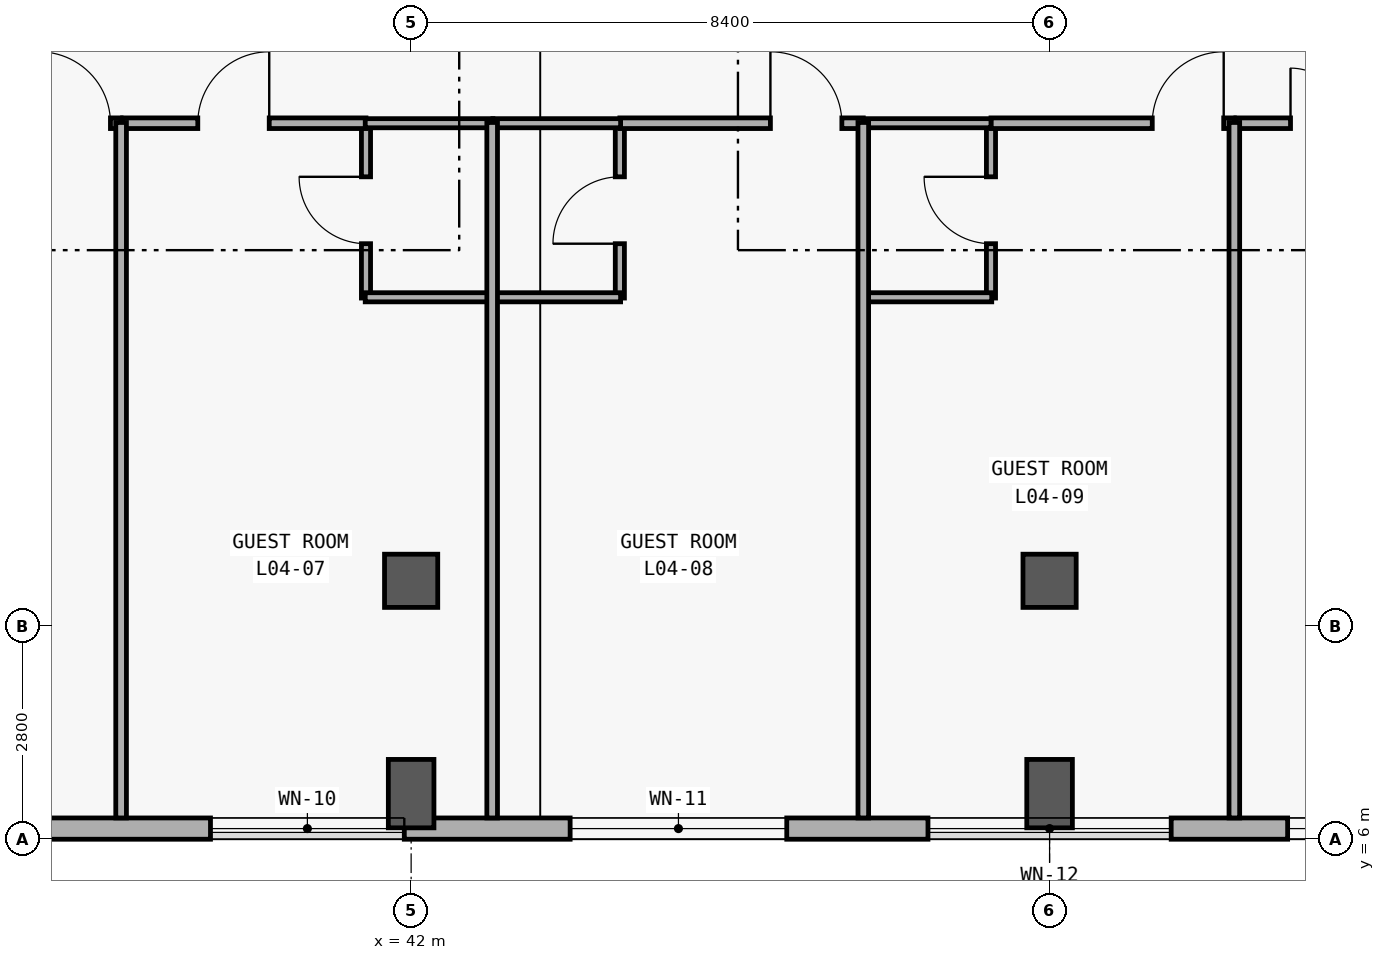
"""IFC4 building model, lengths in metres.
Left out: names, types, materials, properties, quantities, classifications, styles, units other than length and angle.
Written with IfcOpenShell. Run it as: python <this file> out.ifc"""

import sys

from ifc_helpers import new_model, si_unit, direction, frame, frame_2d, origin, origin_2d, place, context, subcontext, project, spatial, rectangle, extrude, element, fill, save


model = new_model("IFC4")
c1 = context("Model", 3, precision=1e-05, world=origin(), true_north=direction((0.0, 1.0)))
c2 = subcontext(c1, "Body", "Model", "MODEL_VIEW")
j1 = project(units=[si_unit("LENGTHUNIT", "METRE"), si_unit("PLANEANGLEUNIT", "RADIAN")], contexts=[c1])
p1 = place(None, origin())
s1 = spatial("IfcSite", under=j1, at=p1, CompositionType="ELEMENT")
p2 = place(p1, origin())
s2 = spatial("IfcBuilding", under=s1, at=p2, CompositionType="ELEMENT")
p3 = place(p2, frame((0.0, 0.0, 19.2)))
s3 = spatial("IfcBuildingStorey", under=s2, at=p3, CompositionType="ELEMENT", Elevation=19.2)
p4 = place(p3, frame((42.0, 6.6, 0.0), z_axis=(0.0, 0.0, 1.0), x_axis=(0.0, 1.0, 0.0)))
e1 = element("IfcColumn", 1, at=p4, inside=s3, PredefinedType="COLUMN", context=c2, shape_type="SweptSolid", body=[
    extrude(rectangle(XDim=0.6, YDim=0.9, at=origin_2d()), origin(), (0.0, 0.0, 1.0), 3.6),
])
p5 = place(p3, frame((42.0, 9.4, 0.0), z_axis=(0.0, 0.0, 1.0), x_axis=(1.0, 0.0, 0.0)))
e2 = element("IfcColumn", 2, at=p5, inside=s3, PredefinedType="COLUMN", context=c2, shape_type="SweptSolid", body=[
    extrude(rectangle(XDim=0.7, YDim=0.7, at=origin_2d()), origin(), (0.0, 0.0, 1.0), 3.6),
])
p6 = place(p3, frame((50.4, 6.6, 0.0), z_axis=(0.0, 0.0, 1.0), x_axis=(0.0, 1.0, 0.0)))
e3 = element("IfcColumn", 3, at=p6, inside=s3, PredefinedType="COLUMN", context=c2, shape_type="SweptSolid", body=[
    extrude(rectangle(XDim=0.6, YDim=0.9, at=origin_2d()), origin(), (0.0, 0.0, 1.0), 3.6),
])
p7 = place(p3, frame((50.4, 9.4, 0.0), z_axis=(0.0, 0.0, 1.0), x_axis=(1.0, 0.0, 0.0)))
e4 = element("IfcColumn", 4, at=p7, inside=s3, PredefinedType="COLUMN", context=c2, shape_type="SweptSolid", body=[
    extrude(rectangle(XDim=0.7, YDim=0.7, at=origin_2d()), origin(), (0.0, 0.0, 1.0), 3.6),
])
p8 = place(p3, frame((92.12, 6.14, 0.0), z_axis=(0.0, 0.0, 1.0), x_axis=(-1.0, 0.0, 0.0)))
e5 = element("IfcWall", 5, at=p8, inside=s3, PredefinedType="SOLIDWALL", context=c2, shape_type="SweptSolid", body=[
    extrude(rectangle(XDim=83.44, YDim=0.28, at=frame_2d((41.72, 0.0))), origin(), (0.0, 0.0, 1.0), 3.32),
])
p9 = place(p8, frame((79.429, 0.0, 0.85)))
e6 = element("IfcOpeningElement", 6, at=p9, cuts=e5, PredefinedType="OPENING", context=c2, shape_type="SweptSolid", body=[
    extrude(rectangle(XDim=2.7, YDim=1.85, at=frame_2d((1.35, 0.925))), frame((0.0, 0.15, 0.0), z_axis=(0.0, -1.0, 0.0), x_axis=(1.0, 0.0, 0.0)), (0.0, 0.0, 1.0), 0.3),
])
p10 = place(p8, frame((74.397, 0.0, 0.85)))
e7 = element("IfcOpeningElement", 7, at=p10, cuts=e5, PredefinedType="OPENING", context=c2, shape_type="SweptSolid", body=[
    extrude(rectangle(XDim=3.0, YDim=1.9, at=frame_2d((1.5, 0.95))), frame((0.0, 0.15, 0.0), z_axis=(0.0, -1.0, 0.0), x_axis=(1.0, 0.0, 0.0)), (0.0, 0.0, 1.0), 0.3),
])
p11 = place(p8, frame((70.264, 0.0, 0.85)))
e8 = element("IfcOpeningElement", 8, at=p11, cuts=e5, PredefinedType="OPENING", context=c2, shape_type="SweptSolid", body=[
    extrude(rectangle(XDim=1.5, YDim=1.75, at=frame_2d((0.75, 0.875))), frame((0.0, 0.15, 0.0), z_axis=(0.0, -1.0, 0.0), x_axis=(1.0, 0.0, 0.0)), (0.0, 0.0, 1.0), 0.3),
])
p12 = place(p8, frame((65.307, 0.0, 0.85)))
e9 = element("IfcOpeningElement", 9, at=p12, cuts=e5, PredefinedType="OPENING", context=c2, shape_type="SweptSolid", body=[
    extrude(rectangle(XDim=1.65, YDim=1.75, at=frame_2d((0.825, 0.875))), frame((0.0, 0.15, 0.0), z_axis=(0.0, -1.0, 0.0), x_axis=(1.0, 0.0, 0.0)), (0.0, 0.0, 1.0), 0.3),
])
p13 = place(p8, frame((60.275, 0.0, 0.85)))
e10 = element("IfcOpeningElement", 10, at=p13, cuts=e5, PredefinedType="OPENING", context=c2, shape_type="SweptSolid", body=[
    extrude(rectangle(XDim=1.95, YDim=1.75, at=frame_2d((0.975, 0.875))), frame((0.0, 0.15, 0.0), z_axis=(0.0, -1.0, 0.0), x_axis=(1.0, 0.0, 0.0)), (0.0, 0.0, 1.0), 0.3),
])
p14 = place(p8, frame((55.242, 0.0, 0.85)))
e11 = element("IfcOpeningElement", 11, at=p14, cuts=e5, PredefinedType="OPENING", context=c2, shape_type="SweptSolid", body=[
    extrude(rectangle(XDim=2.25, YDim=1.75, at=frame_2d((1.125, 0.875))), frame((0.0, 0.15, 0.0), z_axis=(0.0, -1.0, 0.0), x_axis=(1.0, 0.0, 0.0)), (0.0, 0.0, 1.0), 0.3),
])
p15 = place(p8, frame((50.21, 0.0, 0.85)))
e12 = element("IfcOpeningElement", 12, at=p15, cuts=e5, PredefinedType="OPENING", context=c2, shape_type="SweptSolid", body=[
    extrude(rectangle(XDim=2.55, YDim=1.8, at=frame_2d((1.275, 0.9))), frame((0.0, 0.15, 0.0), z_axis=(0.0, -1.0, 0.0), x_axis=(1.0, 0.0, 0.0)), (0.0, 0.0, 1.0), 0.3),
])
p16 = place(p8, frame((45.178, 0.0, 0.85)))
e13 = element("IfcOpeningElement", 13, at=p16, cuts=e5, PredefinedType="OPENING", context=c2, shape_type="SweptSolid", body=[
    extrude(rectangle(XDim=2.85, YDim=1.85, at=frame_2d((1.425, 0.925))), frame((0.0, 0.15, 0.0), z_axis=(0.0, -1.0, 0.0), x_axis=(1.0, 0.0, 0.0)), (0.0, 0.0, 1.0), 0.3),
])
p17 = place(p8, frame((40.12, 0.0, 0.85)))
e14 = element("IfcOpeningElement", 14, at=p17, cuts=e5, PredefinedType="OPENING", context=c2, shape_type="SweptSolid", body=[
    extrude(rectangle(XDim=3.2, YDim=1.95, at=frame_2d((1.6, 0.975))), frame((0.0, 0.15, 0.0), z_axis=(0.0, -1.0, 0.0), x_axis=(1.0, 0.0, 0.0)), (0.0, 0.0, 1.0), 0.3),
])
p18 = place(p8, frame((35.088, 0.0, 0.85)))
e15 = element("IfcOpeningElement", 15, at=p18, cuts=e5, PredefinedType="OPENING", context=c2, shape_type="SweptSolid", body=[
    extrude(rectangle(XDim=3.5, YDim=2.0, at=frame_2d((1.75, 1.0))), frame((0.0, 0.15, 0.0), z_axis=(0.0, -1.0, 0.0), x_axis=(1.0, 0.0, 0.0)), (0.0, 0.0, 1.0), 0.3),
])
p19 = place(p8, frame((31.255, 0.0, 0.85)))
e16 = element("IfcOpeningElement", 16, at=p19, cuts=e5, PredefinedType="OPENING", context=c2, shape_type="SweptSolid", body=[
    extrude(rectangle(XDim=1.4, YDim=1.6, at=frame_2d((0.7, 0.8))), frame((0.0, 0.15, 0.0), z_axis=(0.0, -1.0, 0.0), x_axis=(1.0, 0.0, 0.0)), (0.0, 0.0, 1.0), 0.3),
])
p20 = place(p8, frame((26.273, 0.0, 0.85)))
e17 = element("IfcOpeningElement", 17, at=p20, cuts=e5, PredefinedType="OPENING", context=c2, shape_type="SweptSolid", body=[
    extrude(rectangle(XDim=1.6, YDim=1.6, at=frame_2d((0.8, 0.8))), frame((0.0, 0.15, 0.0), z_axis=(0.0, -1.0, 0.0), x_axis=(1.0, 0.0, 0.0)), (0.0, 0.0, 1.0), 0.3),
])
p21 = place(p8, frame((21.291, 0.0, 0.85)))
e18 = element("IfcOpeningElement", 18, at=p21, cuts=e5, PredefinedType="OPENING", context=c2, shape_type="SweptSolid", body=[
    extrude(rectangle(XDim=1.8, YDim=1.6, at=frame_2d((0.9, 0.8))), frame((0.0, 0.15, 0.0), z_axis=(0.0, -1.0, 0.0), x_axis=(1.0, 0.0, 0.0)), (0.0, 0.0, 1.0), 0.3),
])
p22 = place(p8, frame((16.308, 0.0, 0.85)))
e19 = element("IfcOpeningElement", 19, at=p22, cuts=e5, PredefinedType="OPENING", context=c2, shape_type="SweptSolid", body=[
    extrude(rectangle(XDim=2.0, YDim=1.65, at=frame_2d((1.0, 0.825))), frame((0.0, 0.15, 0.0), z_axis=(0.0, -1.0, 0.0), x_axis=(1.0, 0.0, 0.0)), (0.0, 0.0, 1.0), 0.3),
])
p23 = place(p8, frame((11.326, 0.0, 0.85)))
e20 = element("IfcOpeningElement", 20, at=p23, cuts=e5, PredefinedType="OPENING", context=c2, shape_type="SweptSolid", body=[
    extrude(rectangle(XDim=2.2, YDim=1.65, at=frame_2d((1.1, 0.825))), frame((0.0, 0.15, 0.0), z_axis=(0.0, -1.0, 0.0), x_axis=(1.0, 0.0, 0.0)), (0.0, 0.0, 1.0), 0.3),
])
p24 = place(p8, frame((6.243, 0.0, 0.85)))
e21 = element("IfcOpeningElement", 21, at=p24, cuts=e5, PredefinedType="OPENING", context=c2, shape_type="SweptSolid", body=[
    extrude(rectangle(XDim=2.6, YDim=2.2, at=frame_2d((1.3, 1.1))), frame((0.0, 0.15, 0.0), z_axis=(0.0, -1.0, 0.0), x_axis=(1.0, 0.0, 0.0)), (0.0, 0.0, 1.0), 0.3),
])
p25 = place(p8, frame((1.111, 0.0, 0.85)))
e22 = element("IfcOpeningElement", 22, at=p25, cuts=e5, PredefinedType="OPENING", context=c2, shape_type="SweptSolid", body=[
    extrude(rectangle(XDim=3.1, YDim=2.2, at=frame_2d((1.55, 1.1))), frame((0.0, 0.15, 0.0), z_axis=(0.0, -1.0, 0.0), x_axis=(1.0, 0.0, 0.0)), (0.0, 0.0, 1.0), 0.3),
])
p26 = place(p3, frame((41.406, 13.12, 0.0), z_axis=(0.0, 0.0, 1.0), x_axis=(0.0, 1.0, 0.0)))
e23 = element("IfcWall", 23, at=p26, inside=s3, PredefinedType="PARTITIONING", context=c2, shape_type="SweptSolid", body=[
    extrude(rectangle(XDim=2.31, YDim=0.12, at=frame_2d((1.155, 0.0))), origin(), (0.0, 0.0, 1.0), 2.48),
])
p27 = place(p26, frame((0.715, 0.0, 0.0)))
e24 = element("IfcOpeningElement", 24, at=p27, cuts=e23, PredefinedType="OPENING", context=c2, shape_type="SweptSolid", body=[
    extrude(rectangle(XDim=0.88, YDim=2.15, at=frame_2d((0.44, 1.075))), frame((0.0, 0.07, 0.0), z_axis=(0.0, -1.0, 0.0), x_axis=(1.0, 0.0, 0.0)), (0.0, 0.0, 1.0), 0.14),
])
p28 = place(p3, frame((44.746, 13.12, 0.0), z_axis=(0.0, 0.0, 1.0), x_axis=(0.0, 1.0, 0.0)))
e25 = element("IfcWall", 25, at=p28, inside=s3, PredefinedType="PARTITIONING", context=c2, shape_type="SweptSolid", body=[
    extrude(rectangle(XDim=2.31, YDim=0.12, at=frame_2d((1.155, 0.0))), origin(), (0.0, 0.0, 1.0), 2.48),
])
p29 = place(p28, frame((0.715, 0.0, 0.0)))
e26 = element("IfcOpeningElement", 26, at=p29, cuts=e25, PredefinedType="OPENING", context=c2, shape_type="SweptSolid", body=[
    extrude(rectangle(XDim=0.88, YDim=2.15, at=frame_2d((0.44, 1.075))), frame((0.0, 0.07, 0.0), z_axis=(0.0, -1.0, 0.0), x_axis=(1.0, 0.0, 0.0)), (0.0, 0.0, 1.0), 0.14),
])
p30 = place(p3, frame((49.629, 13.12, 0.0), z_axis=(0.0, 0.0, 1.0), x_axis=(0.0, 1.0, 0.0)))
e27 = element("IfcWall", 27, at=p30, inside=s3, PredefinedType="PARTITIONING", context=c2, shape_type="SweptSolid", body=[
    extrude(rectangle(XDim=2.31, YDim=0.12, at=frame_2d((1.155, 0.0))), origin(), (0.0, 0.0, 1.0), 2.48),
])
p31 = place(p30, frame((0.715, 0.0, 0.0)))
e28 = element("IfcOpeningElement", 28, at=p31, cuts=e27, PredefinedType="OPENING", context=c2, shape_type="SweptSolid", body=[
    extrude(rectangle(XDim=0.88, YDim=2.15, at=frame_2d((0.44, 1.075))), frame((0.0, 0.07, 0.0), z_axis=(0.0, -1.0, 0.0), x_axis=(1.0, 0.0, 0.0)), (0.0, 0.0, 1.0), 0.14),
])
p32 = place(p3, frame((34.982, 15.42, 0.0), z_axis=(0.0, 0.0, 1.0), x_axis=(1.0, 0.0, 0.0)))
e29 = element("IfcWall", 29, at=p32, inside=s3, PredefinedType="PARTITIONING", context=c2, shape_type="SweptSolid", body=[
    extrude(rectangle(XDim=3.202, YDim=0.14, at=frame_2d((1.601, 0.0))), origin(), (0.0, 0.0, 1.0), 2.48),
])
p33 = place(p32, frame((2.122, 0.0, 0.0)))
e30 = element("IfcOpeningElement", 30, at=p33, cuts=e29, PredefinedType="OPENING", context=c2, shape_type="SweptSolid", body=[
    extrude(rectangle(XDim=0.94, YDim=2.2, at=frame_2d((0.47, 1.1))), frame((0.0, 0.08, 0.0), z_axis=(0.0, -1.0, 0.0), x_axis=(1.0, 0.0, 0.0)), (0.0, 0.0, 1.0), 0.16),
])
p34 = place(p3, frame((38.204, 15.42, 0.0), z_axis=(0.0, 0.0, 1.0), x_axis=(1.0, 0.0, 0.0)))
e31 = element("IfcWall", 31, at=p34, inside=s3, PredefinedType="PARTITIONING", context=c2, shape_type="SweptSolid", body=[
    extrude(rectangle(XDim=3.202, YDim=0.14, at=frame_2d((1.601, 0.0))), origin(), (0.0, 0.0, 1.0), 2.48),
])
p35 = place(p34, frame((0.989, 0.0, 0.0)))
e32 = element("IfcOpeningElement", 32, at=p35, cuts=e31, PredefinedType="OPENING", context=c2, shape_type="SweptSolid", body=[
    extrude(rectangle(XDim=0.94, YDim=2.2, at=frame_2d((0.47, 1.1))), frame((0.0, 0.08, 0.0), z_axis=(0.0, -1.0, 0.0), x_axis=(1.0, 0.0, 0.0)), (0.0, 0.0, 1.0), 0.16),
])
p36 = place(p3, frame((44.746, 15.42, 0.0), z_axis=(0.0, 0.0, 1.0), x_axis=(1.0, 0.0, 0.0)))
e33 = element("IfcWall", 33, at=p36, inside=s3, PredefinedType="PARTITIONING", context=c2, shape_type="SweptSolid", body=[
    extrude(rectangle(XDim=3.203, YDim=0.14, at=frame_2d((1.602, 0.0))), origin(), (0.0, 0.0, 1.0), 2.48),
])
p37 = place(p36, frame((1.981, 0.0, 0.0)))
e34 = element("IfcOpeningElement", 34, at=p37, cuts=e33, PredefinedType="OPENING", context=c2, shape_type="SweptSolid", body=[
    extrude(rectangle(XDim=0.94, YDim=2.2, at=frame_2d((0.47, 1.1))), frame((0.0, 0.08, 0.0), z_axis=(0.0, -1.0, 0.0), x_axis=(1.0, 0.0, 0.0)), (0.0, 0.0, 1.0), 0.16),
])
p38 = place(p3, frame((49.629, 15.42, 0.0), z_axis=(0.0, 0.0, 1.0), x_axis=(1.0, 0.0, 0.0)))
e35 = element("IfcWall", 35, at=p38, inside=s3, PredefinedType="PARTITIONING", context=c2, shape_type="SweptSolid", body=[
    extrude(rectangle(XDim=3.202, YDim=0.14, at=frame_2d((1.601, 0.0))), origin(), (0.0, 0.0, 1.0), 2.48),
])
p39 = place(p38, frame((2.122, 0.0, 0.0)))
e36 = element("IfcOpeningElement", 36, at=p39, cuts=e35, PredefinedType="OPENING", context=c2, shape_type="SweptSolid", body=[
    extrude(rectangle(XDim=0.94, YDim=2.2, at=frame_2d((0.47, 1.1))), frame((0.0, 0.08, 0.0), z_axis=(0.0, -1.0, 0.0), x_axis=(1.0, 0.0, 0.0)), (0.0, 0.0, 1.0), 0.16),
])
p40 = place(p3, frame((52.851, 15.42, 0.0), z_axis=(0.0, 0.0, 1.0), x_axis=(1.0, 0.0, 0.0)))
e37 = element("IfcWall", 37, at=p40, inside=s3, PredefinedType="PARTITIONING", context=c2, shape_type="SweptSolid", body=[
    extrude(rectangle(XDim=3.203, YDim=0.14, at=frame_2d((1.602, 0.0))), origin(), (0.0, 0.0, 1.0), 2.48),
])
p41 = place(p40, frame((0.719, 0.0, 0.0)))
e38 = element("IfcOpeningElement", 38, at=p41, cuts=e37, PredefinedType="OPENING", context=c2, shape_type="SweptSolid", body=[
    extrude(rectangle(XDim=1.45, YDim=2.3, at=frame_2d((0.725, 1.15))), frame((0.0, 0.08, 0.0), z_axis=(0.0, -1.0, 0.0), x_axis=(1.0, 0.0, 0.0)), (0.0, 0.0, 1.0), 0.16),
])
for number, where, z_axis, x_axis in (
    (39, (41.396, 13.13, 0.0), (0.0, 0.0, 1.0), (1.0, 0.0, 0.0)),
    (40, (41.396, 15.42, 0.0), (0.0, 0.0, 1.0), (1.0, 0.0, 0.0)),
):
    element("IfcWall", number, at=place(p3, frame(where, z_axis=z_axis, x_axis=x_axis)), inside=s3, PredefinedType="PARTITIONING", context=c2, shape_type="SweptSolid", body=[
        extrude(rectangle(XDim=1.68, YDim=0.12, at=frame_2d((0.84, 0.0))), origin(), (0.0, 0.0, 1.0), 2.48),
    ])
for number, where, z_axis, x_axis in (
    (41, (43.076, 13.13, 0.0), (0.0, 0.0, 1.0), (1.0, 0.0, 0.0)),
    (42, (43.076, 15.42, 0.0), (0.0, 0.0, 1.0), (1.0, 0.0, 0.0)),
):
    element("IfcWall", number, at=place(p3, frame(where, z_axis=z_axis, x_axis=x_axis)), inside=s3, PredefinedType="PARTITIONING", context=c2, shape_type="SweptSolid", body=[
        extrude(rectangle(XDim=1.68, YDim=0.12, at=frame_2d((0.84, 0.0))), origin(), (0.0, 0.0, 1.0), 2.48),
    ])
p42 = place(p3, frame((47.959, 13.13, 0.0), z_axis=(0.0, 0.0, 1.0), x_axis=(1.0, 0.0, 0.0)))
e43 = element("IfcWall", 43, at=p42, inside=s3, PredefinedType="PARTITIONING", context=c2, shape_type="SweptSolid", body=[
    extrude(rectangle(XDim=1.68, YDim=0.12, at=frame_2d((0.84, 0.0))), origin(), (0.0, 0.0, 1.0), 2.48),
])
p43 = place(p3, frame((47.959, 15.42, 0.0), z_axis=(0.0, 0.0, 1.0), x_axis=(1.0, 0.0, 0.0)))
e44 = element("IfcWall", 44, at=p43, inside=s3, PredefinedType="PARTITIONING", context=c2, shape_type="SweptSolid", body=[
    extrude(rectangle(XDim=1.67, YDim=0.12, at=frame_2d((0.835, 0.0))), origin(), (0.0, 0.0, 1.0), 2.48),
])
for number, where, z_axis, x_axis in (
    (45, (38.184, 6.28, 0.0), (0.0, 0.0, 1.0), (0.0, 1.0, 0.0)),
    (46, (43.066, 6.28, 0.0), (0.0, 0.0, 1.0), (0.0, 1.0, 0.0)),
    (47, (47.949, 6.28, 0.0), (0.0, 0.0, 1.0), (0.0, 1.0, 0.0)),
    (48, (52.831, 6.28, 0.0), (0.0, 0.0, 1.0), (0.0, 1.0, 0.0)),
):
    element("IfcWall", number, at=place(p3, frame(where, z_axis=z_axis, x_axis=x_axis)), inside=s3, PredefinedType="PARTITIONING", context=c2, shape_type="SweptSolid", body=[
        extrude(rectangle(XDim=9.15, YDim=0.14, at=frame_2d((4.575, 0.0))), origin(), (0.0, 0.0, 1.0), 2.48),
    ])
p44 = place(p15, origin())
e49 = element("IfcWindow", 49, at=p44, inside=s3, PartitioningType="SINGLE_PANEL", PredefinedType="WINDOW", context=c2, shape_type="SweptSolid", body=[
    extrude(rectangle(XDim=2.55, YDim=1.8, at=frame_2d((1.275, 0.9))), frame((0.0, 0.03, 0.0), z_axis=(0.0, -1.0, 0.0), x_axis=(1.0, 0.0, 0.0)), (0.0, 0.0, 1.0), 0.06),
])
fill(e12, e49)
p45 = place(p16, origin())
e50 = element("IfcWindow", 50, at=p45, inside=s3, PartitioningType="SINGLE_PANEL", PredefinedType="WINDOW", context=c2, shape_type="SweptSolid", body=[
    extrude(rectangle(XDim=2.85, YDim=1.85, at=frame_2d((1.425, 0.925))), frame((0.0, 0.03, 0.0), z_axis=(0.0, -1.0, 0.0), x_axis=(1.0, 0.0, 0.0)), (0.0, 0.0, 1.0), 0.06),
])
fill(e13, e50)
p46 = place(p17, origin())
e51 = element("IfcWindow", 51, at=p46, inside=s3, PartitioningType="SINGLE_PANEL", PredefinedType="WINDOW", context=c2, shape_type="SweptSolid", body=[
    extrude(rectangle(XDim=3.2, YDim=1.95, at=frame_2d((1.6, 0.975))), frame((0.0, 0.03, 0.0), z_axis=(0.0, -1.0, 0.0), x_axis=(1.0, 0.0, 0.0)), (0.0, 0.0, 1.0), 0.06),
])
fill(e14, e51)
p47 = place(p18, origin())
e52 = element("IfcWindow", 52, at=p47, inside=s3, PartitioningType="SINGLE_PANEL", PredefinedType="WINDOW", context=c2, shape_type="SweptSolid", body=[
    extrude(rectangle(XDim=3.5, YDim=2.0, at=frame_2d((1.75, 1.0))), frame((0.0, 0.03, 0.0), z_axis=(0.0, -1.0, 0.0), x_axis=(1.0, 0.0, 0.0)), (0.0, 0.0, 1.0), 0.06),
])
fill(e15, e52)
p48 = place(p27, origin())
e53 = element("IfcDoor", 53, at=p48, inside=s3, OperationType="SINGLE_SWING_RIGHT", PredefinedType="DOOR", context=c2, shape_type="SweptSolid", body=[
    extrude(rectangle(XDim=0.88, YDim=2.15, at=frame_2d((0.44, 1.075))), frame((0.0, 0.025, 0.0), z_axis=(0.0, -1.0, 0.0), x_axis=(1.0, 0.0, 0.0)), (0.0, 0.0, 1.0), 0.05),
])
fill(e24, e53)
p49 = place(p29, origin())
e54 = element("IfcDoor", 54, at=p49, inside=s3, OperationType="SINGLE_SWING_LEFT", PredefinedType="DOOR", context=c2, shape_type="SweptSolid", body=[
    extrude(rectangle(XDim=0.88, YDim=2.15, at=frame_2d((0.44, 1.075))), frame((0.0, 0.025, 0.0), z_axis=(0.0, -1.0, 0.0), x_axis=(1.0, 0.0, 0.0)), (0.0, 0.0, 1.0), 0.05),
])
fill(e26, e54)
p50 = place(p31, origin())
e55 = element("IfcDoor", 55, at=p50, inside=s3, OperationType="SINGLE_SWING_RIGHT", PredefinedType="DOOR", context=c2, shape_type="SweptSolid", body=[
    extrude(rectangle(XDim=0.88, YDim=2.15, at=frame_2d((0.44, 1.075))), frame((0.0, 0.025, 0.0), z_axis=(0.0, -1.0, 0.0), x_axis=(1.0, 0.0, 0.0)), (0.0, 0.0, 1.0), 0.05),
])
fill(e28, e55)
p51 = place(p33, origin())
e56 = element("IfcDoor", 56, at=p51, inside=s3, OperationType="SINGLE_SWING_LEFT", PredefinedType="DOOR", context=c2, shape_type="SweptSolid", body=[
    extrude(rectangle(XDim=0.94, YDim=2.2, at=frame_2d((0.47, 1.1))), frame((0.0, 0.025, 0.0), z_axis=(0.0, -1.0, 0.0), x_axis=(1.0, 0.0, 0.0)), (0.0, 0.0, 1.0), 0.05),
])
fill(e30, e56)
p52 = place(p35, origin())
e57 = element("IfcDoor", 57, at=p52, inside=s3, OperationType="SINGLE_SWING_RIGHT", PredefinedType="DOOR", context=c2, shape_type="SweptSolid", body=[
    extrude(rectangle(XDim=0.94, YDim=2.2, at=frame_2d((0.47, 1.1))), frame((0.0, 0.025, 0.0), z_axis=(0.0, -1.0, 0.0), x_axis=(1.0, 0.0, 0.0)), (0.0, 0.0, 1.0), 0.05),
])
fill(e32, e57)
p53 = place(p37, origin())
e58 = element("IfcDoor", 58, at=p53, inside=s3, OperationType="SINGLE_SWING_LEFT", PredefinedType="DOOR", context=c2, shape_type="SweptSolid", body=[
    extrude(rectangle(XDim=0.94, YDim=2.2, at=frame_2d((0.47, 1.1))), frame((0.0, 0.025, 0.0), z_axis=(0.0, -1.0, 0.0), x_axis=(1.0, 0.0, 0.0)), (0.0, 0.0, 1.0), 0.05),
])
fill(e34, e58)
p54 = place(p39, origin())
e59 = element("IfcDoor", 59, at=p54, inside=s3, OperationType="SINGLE_SWING_RIGHT", PredefinedType="DOOR", context=c2, shape_type="SweptSolid", body=[
    extrude(rectangle(XDim=0.94, YDim=2.2, at=frame_2d((0.47, 1.1))), frame((0.0, 0.025, 0.0), z_axis=(0.0, -1.0, 0.0), x_axis=(1.0, 0.0, 0.0)), (0.0, 0.0, 1.0), 0.05),
])
fill(e36, e59)
p55 = place(p41, origin())
e60 = element("IfcDoor", 60, at=p55, inside=s3, OperationType="DOUBLE_DOOR_SINGLE_SWING", PredefinedType="DOOR", context=c2, shape_type="SweptSolid", body=[
    extrude(rectangle(XDim=1.45, YDim=2.3, at=frame_2d((0.725, 1.15))), frame((0.0, 0.025, 0.0), z_axis=(0.0, -1.0, 0.0), x_axis=(1.0, 0.0, 0.0)), (0.0, 0.0, 1.0), 0.05),
])
fill(e38, e60)
save(model, sys.argv[1])
